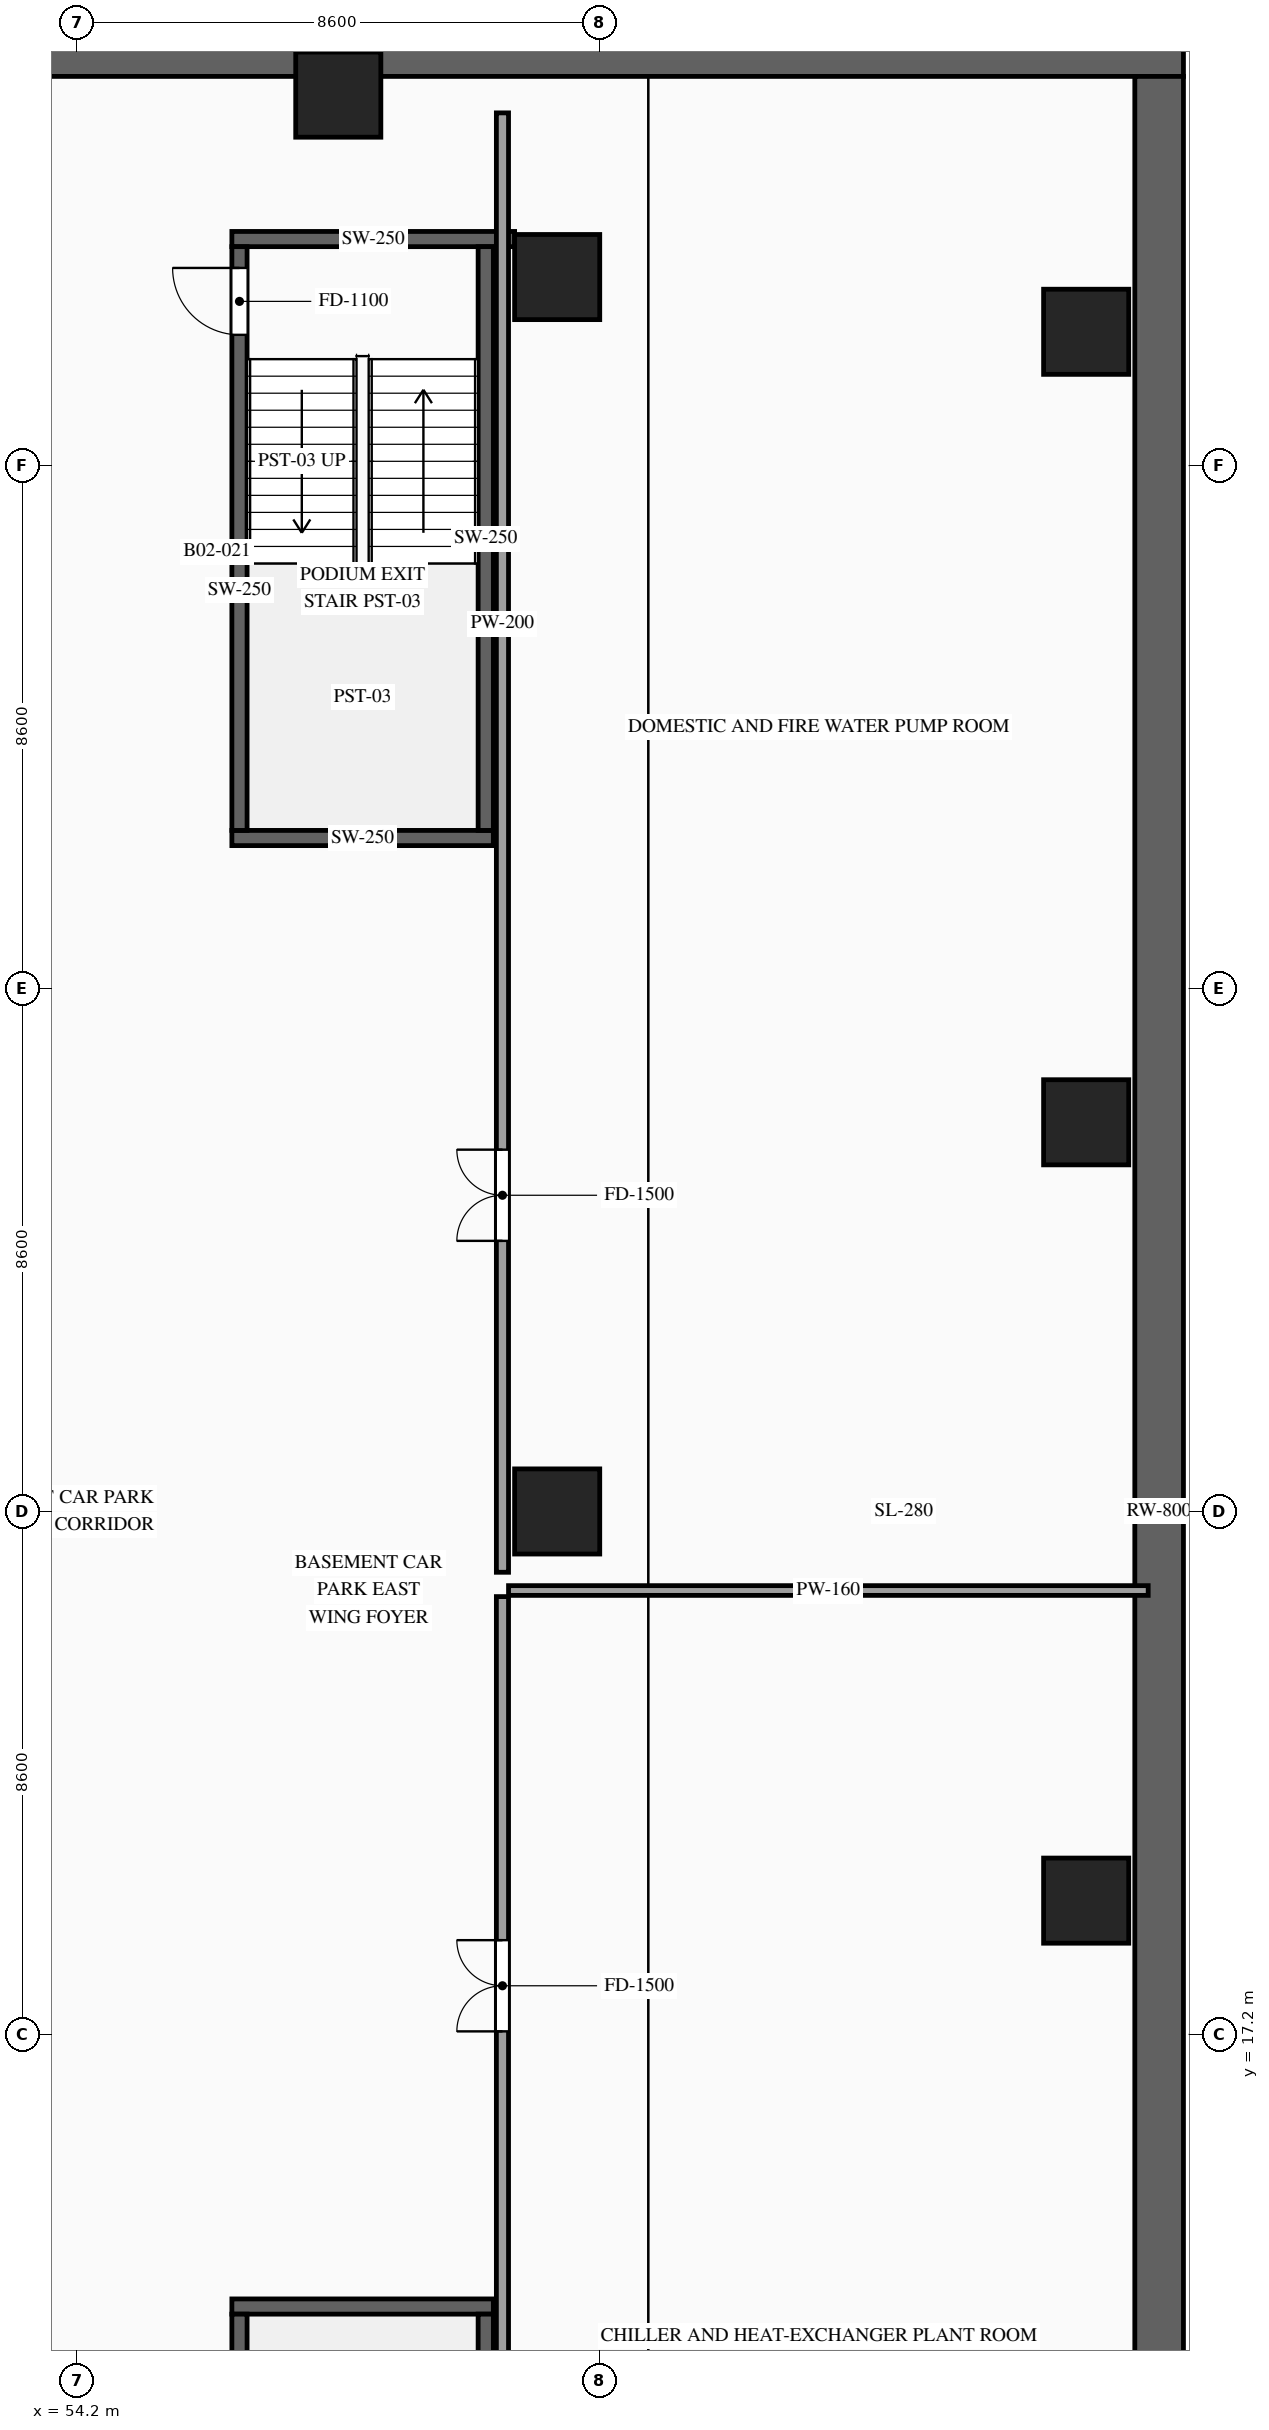
"""IFC4 building model, lengths in metres.
Left out: names, types, materials, properties, quantities, classifications, styles, units other than length and angle.
Written with IfcOpenShell. Run it as: python <this file> out.ifc"""

import sys

from ifc_helpers import new_model, si_unit, direction, frame, frame_2d, origin, origin_2d, place, context, subcontext, project, spatial, rectangle, extrude, source, transform, mapped, element, fill, save


model = new_model("IFC4")
c1 = context("Model", 3, precision=1e-05, world=origin(), true_north=direction((0.0, 1.0)))
c2 = subcontext(c1, "Body", "Model", "MODEL_VIEW")
j1 = project(units=[si_unit("LENGTHUNIT", "METRE"), si_unit("PLANEANGLEUNIT", "RADIAN")], contexts=[c1])
p1 = place(None, origin())
s1 = spatial("IfcSite", under=j1, at=p1, CompositionType="ELEMENT")
p2 = place(p1, origin())
s2 = spatial("IfcBuilding", under=s1, at=p2, CompositionType="ELEMENT")
p3 = place(p2, frame((0.0, 0.0, -9.0)))
s3 = spatial("IfcBuildingStorey", under=s2, at=p3, CompositionType="ELEMENT", Elevation=-9.0)
m1 = source(origin(), c2, "Body", "SweptSolid", [
    extrude(rectangle(XDim=70.8, YDim=0.8, at=frame_2d((35.4, 0.0))), origin(), (0.0, 0.0, 1.0), 4.5),
])
p4 = place(p3, frame((1.6, 49.8, 0.0), z_axis=(0.0, 0.0, 1.0), x_axis=(1.0, 0.0, 0.0)))
e1 = element("IfcWall", 1, at=p4, inside=s3, PredefinedType="USERDEFINED", context=c2, shape_type="MappedRepresentation", body=[
    mapped(m1, transform((0.0, 0.0, 0.0), scale=1.0)),
])
m2 = source(origin(), c2, "Body", "SweptSolid", [
    extrude(rectangle(XDim=47.2, YDim=0.8, at=frame_2d((23.6, 0.0))), origin(), (0.0, 0.0, 1.0), 4.5),
])
p5 = place(p3, frame((72.0, 2.2, 0.0), z_axis=(0.0, 0.0, 1.0), x_axis=(0.0, 1.0, 0.0)))
e2 = element("IfcWall", 2, at=p5, inside=s3, PredefinedType="USERDEFINED", context=c2, shape_type="MappedRepresentation", body=[
    mapped(m2, transform((0.0, 0.0, 0.0), scale=1.0)),
])
m3 = source(origin(), c2, "Body", "SweptSolid", [
    extrude(rectangle(XDim=1.4, YDim=1.4, at=origin_2d()), origin(), (0.0, 0.0, 1.0), 4.5),
])
for number, where, z_axis, x_axis in (
    (3, (70.8, 19.4, 0.0), (0.0, 0.0, 1.0), (1.0, 0.0, 0.0)),
    (4, (70.8, 32.2, 0.0), (0.0, 0.0, 1.0), (1.0, 0.0, 0.0)),
    (5, (70.8, 45.2, 0.0), (0.0, 0.0, 1.0), (1.0, 0.0, 0.0)),
    (6, (62.1, 25.8, 0.0), (0.0, 0.0, 1.0), (1.0, 0.0, 0.0)),
    (7, (62.1, 46.1, 0.0), (0.0, 0.0, 1.0), (1.0, 0.0, 0.0)),
    (8, (58.5, 49.1, 0.0), (0.0, 0.0, 1.0), (1.0, 0.0, 0.0)),
):
    element("IfcColumn", number, at=place(p3, frame(where, z_axis=z_axis, x_axis=x_axis)), inside=s3, PredefinedType="COLUMN", context=c2, shape_type="MappedRepresentation", body=[
        mapped(m3, transform((0.0, 0.0, 0.0), scale=1.0)),
    ])
m4 = source(origin(), c2, "Body", "SweptSolid", [
    extrude(rectangle(XDim=4.3, YDim=0.25, at=frame_2d((2.15, 0.0))), origin(), (0.0, 0.0, 1.0), 4.2),
])
p6 = place(p3, frame((56.75, 12.725, 0.0), z_axis=(0.0, 0.0, 1.0), x_axis=(1.0, 0.0, 0.0)))
e9 = element("IfcWall", 9, at=p6, inside=s3, PredefinedType="SOLIDWALL", context=c2, shape_type="MappedRepresentation", body=[
    mapped(m4, transform((0.0, 0.0, 0.0), scale=1.0)),
])
p7 = place(p3, frame((56.875, 3.0, 0.0), z_axis=(0.0, 0.0, 1.0), x_axis=(0.0, 1.0, 0.0)))
e10 = element("IfcWall", 10, at=p7, inside=s3, PredefinedType="SOLIDWALL", context=c2, shape_type="SweptSolid", body=[
    extrude(rectangle(XDim=9.6, YDim=0.25, at=frame_2d((4.8, 0.0))), origin(), (0.0, 0.0, 1.0), 4.2),
])
p8 = place(p7, frame((0.35, 0.0, 0.0)))
e11 = element("IfcOpeningElement", 11, at=p8, cuts=e10, PredefinedType="OPENING", context=c2, shape_type="SweptSolid", body=[
    extrude(rectangle(XDim=1.1, YDim=2.2, at=frame_2d((0.55, 1.1))), frame((0.0, 0.14, 0.0), z_axis=(0.0, -1.0, 0.0), x_axis=(1.0, 0.0, 0.0)), (0.0, 0.0, 1.0), 0.28),
])
m5 = source(origin(), c2, "Body", "SweptSolid", [
    extrude(rectangle(XDim=9.6, YDim=0.25, at=frame_2d((4.8, 0.0))), origin(), (0.0, 0.0, 1.0), 4.2),
])
p9 = place(p3, frame((60.925, 3.0, 0.0), z_axis=(0.0, 0.0, 1.0), x_axis=(0.0, 1.0, 0.0)))
e12 = element("IfcWall", 12, at=p9, inside=s3, PredefinedType="SOLIDWALL", context=c2, shape_type="MappedRepresentation", body=[
    mapped(m5, transform((0.0, 0.0, 0.0), scale=1.0)),
])
p10 = place(p3, frame((56.75, 36.875, 0.0), z_axis=(0.0, 0.0, 1.0), x_axis=(1.0, 0.0, 0.0)))
e13 = element("IfcWall", 13, at=p10, inside=s3, PredefinedType="SOLIDWALL", context=c2, shape_type="MappedRepresentation", body=[
    mapped(m4, transform((0.0, 0.0, 0.0), scale=1.0)),
])
m6 = source(origin(), c2, "Body", "SweptSolid", [
    extrude(rectangle(XDim=4.65, YDim=0.25, at=frame_2d((2.325, 0.0))), origin(), (0.0, 0.0, 1.0), 4.2),
])
p11 = place(p3, frame((56.75, 46.725, 0.0), z_axis=(0.0, 0.0, 1.0), x_axis=(1.0, 0.0, 0.0)))
e14 = element("IfcWall", 14, at=p11, inside=s3, PredefinedType="SOLIDWALL", context=c2, shape_type="MappedRepresentation", body=[
    mapped(m6, transform((0.0, 0.0, 0.0), scale=1.0)),
])
p12 = place(p3, frame((56.875, 37.0, 0.0), z_axis=(0.0, 0.0, 1.0), x_axis=(0.0, 1.0, 0.0)))
e15 = element("IfcWall", 15, at=p12, inside=s3, PredefinedType="SOLIDWALL", context=c2, shape_type="SweptSolid", body=[
    extrude(rectangle(XDim=9.6, YDim=0.25, at=frame_2d((4.8, 0.0))), origin(), (0.0, 0.0, 1.0), 4.2),
])
p13 = place(p12, frame((8.15, 0.0, 0.0)))
e16 = element("IfcOpeningElement", 16, at=p13, cuts=e15, PredefinedType="OPENING", context=c2, shape_type="SweptSolid", body=[
    extrude(rectangle(XDim=1.1, YDim=2.2, at=frame_2d((0.55, 1.1))), frame((0.0, 0.14, 0.0), z_axis=(0.0, -1.0, 0.0), x_axis=(1.0, 0.0, 0.0)), (0.0, 0.0, 1.0), 0.28),
])
p14 = place(p3, frame((60.925, 37.0, 0.0), z_axis=(0.0, 0.0, 1.0), x_axis=(0.0, 1.0, 0.0)))
e17 = element("IfcWall", 17, at=p14, inside=s3, PredefinedType="SOLIDWALL", context=c2, shape_type="MappedRepresentation", body=[
    mapped(m5, transform((0.0, 0.0, 0.0), scale=1.0)),
])
p15 = place(p3, frame((61.2, 2.8, 0.0), z_axis=(0.0, 0.0, 1.0), x_axis=(0.0, 1.0, 0.0)))
e18 = element("IfcWall", 18, at=p15, inside=s3, PredefinedType="PARTITIONING", context=c2, shape_type="SweptSolid", body=[
    extrude(rectangle(XDim=21.6, YDim=0.2, at=frame_2d((10.8, 0.0))), origin(), (0.0, 0.0, 1.0), 4.2),
])
p16 = place(p15, frame((14.45, 0.0, 0.0)))
e19 = element("IfcOpeningElement", 19, at=p16, cuts=e18, PredefinedType="OPENING", context=c2, shape_type="SweptSolid", body=[
    extrude(rectangle(XDim=1.5, YDim=2.3, at=frame_2d((0.75, 1.15))), frame((0.0, 0.115, 0.0), z_axis=(0.0, -1.0, 0.0), x_axis=(1.0, 0.0, 0.0)), (0.0, 0.0, 1.0), 0.23),
])
m7 = source(origin(), c2, "Body", "SweptSolid", [
    extrude(rectangle(XDim=10.52, YDim=0.16, at=frame_2d((5.26, 0.0))), origin(), (0.0, 0.0, 1.0), 4.2),
])
p17 = place(p3, frame((61.3, 24.5, 0.0), z_axis=(0.0, 0.0, 1.0), x_axis=(1.0, 0.0, 0.0)))
e20 = element("IfcWall", 20, at=p17, inside=s3, PredefinedType="PARTITIONING", context=c2, shape_type="MappedRepresentation", body=[
    mapped(m7, transform((0.0, 0.0, 0.0), scale=1.0)),
])
p18 = place(p3, frame((61.2, 24.8, 0.0), z_axis=(0.0, 0.0, 1.0), x_axis=(0.0, 1.0, 0.0)))
e21 = element("IfcWall", 21, at=p18, inside=s3, PredefinedType="PARTITIONING", context=c2, shape_type="SweptSolid", body=[
    extrude(rectangle(XDim=24.0, YDim=0.2, at=frame_2d((12.0, 0.0))), origin(), (0.0, 0.0, 1.0), 4.2),
])
p19 = place(p18, frame((5.45, 0.0, 0.0)))
e22 = element("IfcOpeningElement", 22, at=p19, cuts=e21, PredefinedType="OPENING", context=c2, shape_type="SweptSolid", body=[
    extrude(rectangle(XDim=1.5, YDim=2.3, at=frame_2d((0.75, 1.15))), frame((0.0, 0.115, 0.0), z_axis=(0.0, -1.0, 0.0), x_axis=(1.0, 0.0, 0.0)), (0.0, 0.0, 1.0), 0.23),
])
m8 = source(origin(), c2, "Body", "SweptSolid", [
    extrude(rectangle(XDim=1.1, YDim=2.2, at=frame_2d((0.55, 1.1))), frame((0.0, 0.025, 0.0), z_axis=(0.0, -1.0, 0.0), x_axis=(1.0, 0.0, 0.0)), (0.0, 0.0, 1.0), 0.05),
])
p20 = place(p13, origin())
e23 = element("IfcDoor", 23, at=p20, inside=s3, OperationType="SINGLE_SWING_RIGHT", PredefinedType="DOOR", context=c2, shape_type="MappedRepresentation", body=[
    mapped(m8, transform((0.0, 0.0, 0.0), scale=1.0)),
])
fill(e16, e23)
m9 = source(origin(), c2, "Body", "SweptSolid", [
    extrude(rectangle(XDim=1.5, YDim=2.3, at=frame_2d((0.75, 1.15))), frame((0.0, 0.025, 0.0), z_axis=(0.0, -1.0, 0.0), x_axis=(1.0, 0.0, 0.0)), (0.0, 0.0, 1.0), 0.05),
])
p21 = place(p16, origin())
e24 = element("IfcDoor", 24, at=p21, inside=s3, OperationType="DOUBLE_DOOR_SINGLE_SWING", PredefinedType="DOOR", context=c2, shape_type="MappedRepresentation", body=[
    mapped(m9, transform((0.0, 0.0, 0.0), scale=1.0)),
])
fill(e19, e24)
p22 = place(p19, origin())
e25 = element("IfcDoor", 25, at=p22, inside=s3, OperationType="DOUBLE_DOOR_SINGLE_SWING", PredefinedType="DOOR", context=c2, shape_type="MappedRepresentation", body=[
    mapped(m9, transform((0.0, 0.0, 0.0), scale=1.0)),
])
fill(e22, e25)
save(model, sys.argv[1])
